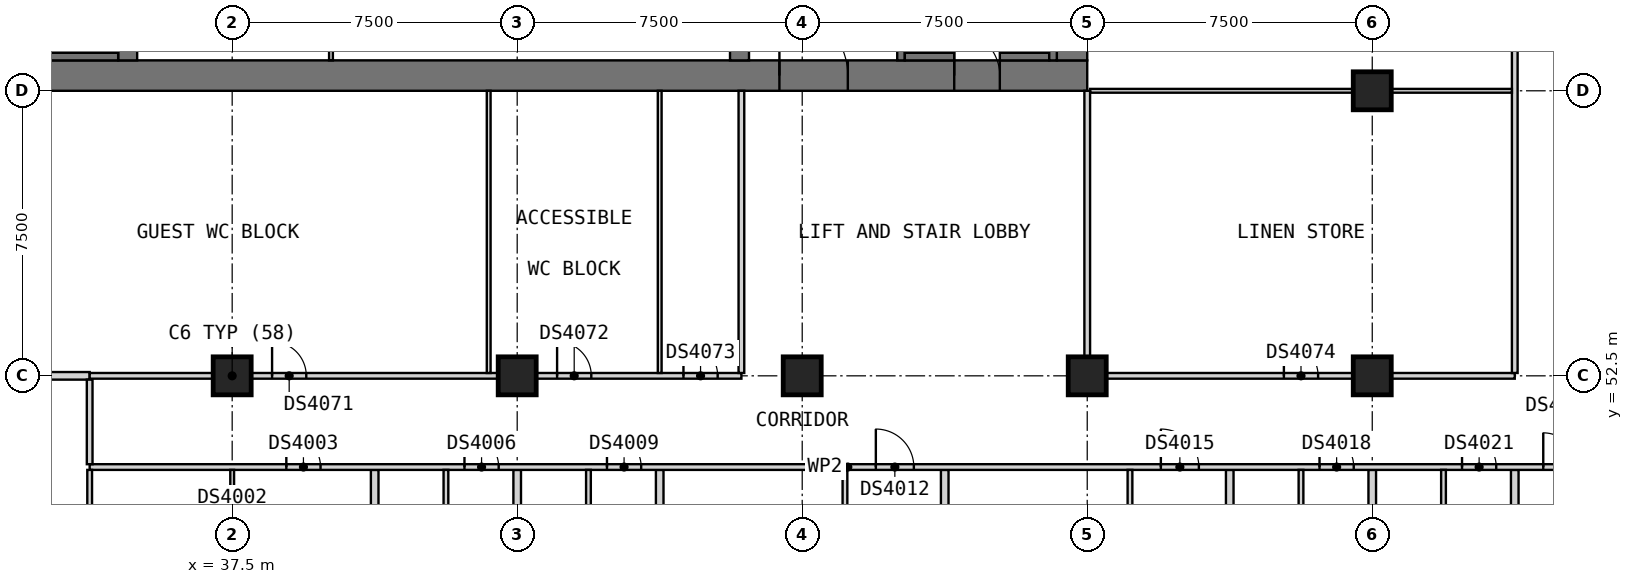
"""IFC4 building model, lengths in metres.
Left out: names, types, materials, properties, quantities, classifications, styles, units other than length and angle.
Written with IfcOpenShell. Run it as: python <this file> out.ifc"""

import sys

from ifc_helpers import new_model, si_unit, direction, frame, frame_2d, origin, origin_2d, place, context, subcontext, project, spatial, rectangle, extrude, element, fill, save


model = new_model("IFC4")
c1 = context("Model", 3, precision=1e-05, world=origin(), true_north=direction((0.0, 1.0)))
c2 = subcontext(c1, "Body", "Model", "MODEL_VIEW")
j1 = project(units=[si_unit("LENGTHUNIT", "METRE"), si_unit("PLANEANGLEUNIT", "RADIAN")], contexts=[c1])
p1 = place(None, origin())
s1 = spatial("IfcSite", under=j1, at=p1, CompositionType="ELEMENT")
p2 = place(p1, origin())
s2 = spatial("IfcBuilding", under=s1, at=p2, CompositionType="ELEMENT")
p3 = place(p2, frame((0.0, 0.0, 141.0)))
s3 = spatial("IfcBuildingStorey", under=s2, at=p3, CompositionType="ELEMENT", Elevation=141.0)
for number, where, z_axis, x_axis in (
    (1, (37.5, 52.5, 0.0), (0.0, 0.0, 1.0), (1.0, 0.0, 0.0)),
    (2, (45.0, 52.5, 0.0), (0.0, 0.0, 1.0), (1.0, 0.0, 0.0)),
    (3, (52.5, 52.5, 0.0), (0.0, 0.0, 1.0), (1.0, 0.0, 0.0)),
    (4, (60.0, 52.5, 0.0), (0.0, 0.0, 1.0), (1.0, 0.0, 0.0)),
    (5, (67.5, 52.5, 0.0), (0.0, 0.0, 1.0), (1.0, 0.0, 0.0)),
    (6, (67.5, 60.0, 0.0), (0.0, 0.0, 1.0), (1.0, 0.0, 0.0)),
):
    element("IfcColumn", number, at=place(p3, frame(where, z_axis=z_axis, x_axis=x_axis)), inside=s3, PredefinedType="COLUMN", context=c2, shape_type="SweptSolid", body=[
        extrude(rectangle(XDim=1.0, YDim=1.0, at=origin_2d()), origin(), (0.0, 0.0, 1.0), 3.6),
    ])
p4 = place(p3, frame((30.0, 60.4, 0.0), z_axis=(0.0, 0.0, 1.0), x_axis=(1.0, 0.0, 0.0)))
e7 = element("IfcWall", 7, at=p4, inside=s3, PredefinedType="SHEAR", context=c2, shape_type="SweptSolid", body=[
    extrude(rectangle(XDim=30.0, YDim=0.8, at=frame_2d((15.0, 0.0))), origin(), (0.0, 0.0, 1.0), 3.6),
])
p5 = place(p4, frame((21.9, 0.0, 0.0)))
e8 = element("IfcOpeningElement", 8, at=p5, cuts=e7, PredefinedType="OPENING", context=c2, shape_type="SweptSolid", body=[
    extrude(rectangle(XDim=1.8, YDim=2.1, at=frame_2d((0.9, 1.05))), frame((0.0, 0.41, 0.0), z_axis=(0.0, -1.0, 0.0), x_axis=(1.0, 0.0, 0.0)), (0.0, 0.0, 1.0), 0.82),
])
p6 = place(p4, frame((26.5, 0.0, 0.0)))
e9 = element("IfcOpeningElement", 9, at=p6, cuts=e7, PredefinedType="OPENING", context=c2, shape_type="SweptSolid", body=[
    extrude(rectangle(XDim=1.2, YDim=2.1, at=frame_2d((0.6, 1.05))), frame((0.0, 0.41, 0.0), z_axis=(0.0, -1.0, 0.0), x_axis=(1.0, 0.0, 0.0)), (0.0, 0.0, 1.0), 0.82),
])
p7 = place(p3, frame((59.6, 60.8, 0.0), z_axis=(0.0, 0.0, 1.0), x_axis=(0.0, 1.0, 0.0)))
e10 = element("IfcWall", 10, at=p7, inside=s3, PredefinedType="SHEAR", context=c2, shape_type="SweptSolid", body=[
    extrude(rectangle(XDim=20.9, YDim=0.8, at=frame_2d((10.45, 0.0))), origin(), (0.0, 0.0, 1.0), 3.6),
])
p8 = place(p7, frame((14.7, 0.0, 0.0)))
e11 = element("IfcOpeningElement", 11, at=p8, cuts=e10, PredefinedType="OPENING", context=c2, shape_type="SweptSolid", body=[
    extrude(rectangle(XDim=1.8, YDim=2.1, at=frame_2d((0.9, 1.05))), frame((0.0, 0.41, 0.0), z_axis=(0.0, -1.0, 0.0), x_axis=(1.0, 0.0, 0.0)), (0.0, 0.0, 1.0), 0.82),
])
for number, where, z_axis, x_axis in (
    (12, (34.75, 60.8, 0.0), (0.0, 0.0, 1.0), (0.0, 1.0, 0.0)),
    (13, (50.85, 60.8, 0.0), (0.0, 0.0, 1.0), (0.0, 1.0, 0.0)),
):
    element("IfcWall", number, at=place(p3, frame(where, z_axis=z_axis, x_axis=x_axis)), inside=s3, PredefinedType="SHEAR", context=c2, shape_type="SweptSolid", body=[
        extrude(rectangle(XDim=3.4, YDim=0.5, at=frame_2d((1.7, 0.0))), origin(), (0.0, 0.0, 1.0), 3.6),
    ])
p9 = place(p3, frame((40.1, 60.8, 0.0), z_axis=(0.0, 0.0, 1.0), x_axis=(0.0, 1.0, 0.0)))
e14 = element("IfcWall", 14, at=p9, inside=s3, PredefinedType="PARTITIONING", context=c2, shape_type="SweptSolid", body=[
    extrude(rectangle(XDim=3.2, YDim=0.1, at=frame_2d((1.6, 0.0))), origin(), (0.0, 0.0, 1.0), 3.35),
])
p10 = place(p3, frame((55.1, 60.8, 0.0), z_axis=(0.0, 0.0, 1.0), x_axis=(0.0, 1.0, 0.0)))
e15 = element("IfcWall", 15, at=p10, inside=s3, PredefinedType="SOLIDWALL", context=c2, shape_type="SweptSolid", body=[
    extrude(rectangle(XDim=7.8, YDim=0.2, at=frame_2d((3.9, 0.0))), origin(), (0.0, 0.0, 1.0), 3.35),
])
p11 = place(p3, frame((31.0, 60.9, 0.0), z_axis=(0.0, 0.0, 1.0), x_axis=(1.0, 0.0, 0.0)))
e16 = element("IfcWall", 16, at=p11, inside=s3, PredefinedType="SOLIDWALL", context=c2, shape_type="SweptSolid", body=[
    extrude(rectangle(XDim=3.5, YDim=0.2, at=frame_2d((1.75, 0.0))), origin(), (0.0, 0.0, 1.0), 3.35),
])
for number, where, z_axis, x_axis in (
    (17, (55.2, 60.9, 0.0), (0.0, 0.0, 1.0), (1.0, 0.0, 0.0)),
    (18, (57.7, 60.9, 0.0), (0.0, 0.0, 1.0), (1.0, 0.0, 0.0)),
):
    element("IfcWall", number, at=place(p3, frame(where, z_axis=z_axis, x_axis=x_axis)), inside=s3, PredefinedType="SOLIDWALL", context=c2, shape_type="SweptSolid", body=[
        extrude(rectangle(XDim=1.3, YDim=0.2, at=frame_2d((0.65, 0.0))), origin(), (0.0, 0.0, 1.0), 3.35),
    ])
p12 = place(p3, frame((59.1, 60.8, 0.0), z_axis=(0.0, 0.0, 1.0), x_axis=(0.0, 1.0, 0.0)))
e19 = element("IfcWall", 19, at=p12, inside=s3, PredefinedType="SOLIDWALL", context=c2, shape_type="SweptSolid", body=[
    extrude(rectangle(XDim=7.7, YDim=0.2, at=frame_2d((3.85, 0.0))), origin(), (0.0, 0.0, 1.0), 3.35),
])
p13 = place(p3, frame((30.0, 52.5, 0.0), z_axis=(0.0, 0.0, 1.0), x_axis=(1.0, 0.0, 0.0)))
e20 = element("IfcWall", 20, at=p13, inside=s3, PredefinedType="PARTITIONING", context=c2, shape_type="SweptSolid", body=[
    extrude(rectangle(XDim=3.75, YDim=0.2, at=frame_2d((1.875, 0.0))), origin(), (0.0, 0.0, 1.0), 3.35),
])
p14 = place(p3, frame((41.25, 38.31, 0.0), z_axis=(0.0, 0.0, 1.0), x_axis=(0.0, 1.0, 0.0)))
e21 = element("IfcWall", 21, at=p14, inside=s3, PredefinedType="PARTITIONING", context=c2, shape_type="SweptSolid", body=[
    extrude(rectangle(XDim=11.715, YDim=0.2, at=frame_2d((5.857, 0.0))), origin(), (0.0, 0.0, 1.0), 3.35),
])
p15 = place(p3, frame((45.0, 37.5, 0.0), z_axis=(0.0, 0.0, 1.0), x_axis=(0.0, 1.0, 0.0)))
e22 = element("IfcWall", 22, at=p15, inside=s3, PredefinedType="PARTITIONING", context=c2, shape_type="SweptSolid", body=[
    extrude(rectangle(XDim=12.525, YDim=0.2, at=frame_2d((6.262, 0.0))), origin(), (0.0, 0.0, 1.0), 3.35),
])
for number, where, z_axis, x_axis in (
    (23, (48.75, 38.31, 0.0), (0.0, 0.0, 1.0), (0.0, 1.0, 0.0)),
    (24, (56.25, 38.31, 0.0), (0.0, 0.0, 1.0), (0.0, 1.0, 0.0)),
    (25, (63.75, 38.31, 0.0), (0.0, 0.0, 1.0), (0.0, 1.0, 0.0)),
):
    element("IfcWall", number, at=place(p3, frame(where, z_axis=z_axis, x_axis=x_axis)), inside=s3, PredefinedType="PARTITIONING", context=c2, shape_type="SweptSolid", body=[
        extrude(rectangle(XDim=11.715, YDim=0.2, at=frame_2d((5.857, 0.0))), origin(), (0.0, 0.0, 1.0), 3.35),
    ])
p16 = place(p3, frame((67.5, 37.5, 0.0), z_axis=(0.0, 0.0, 1.0), x_axis=(0.0, 1.0, 0.0)))
e26 = element("IfcWall", 26, at=p16, inside=s3, PredefinedType="PARTITIONING", context=c2, shape_type="SweptSolid", body=[
    extrude(rectangle(XDim=12.525, YDim=0.2, at=frame_2d((6.262, 0.0))), origin(), (0.0, 0.0, 1.0), 3.35),
])
p17 = place(p3, frame((71.25, 38.31, 0.0), z_axis=(0.0, 0.0, 1.0), x_axis=(0.0, 1.0, 0.0)))
e27 = element("IfcWall", 27, at=p17, inside=s3, PredefinedType="PARTITIONING", context=c2, shape_type="SweptSolid", body=[
    extrude(rectangle(XDim=11.715, YDim=0.2, at=frame_2d((5.857, 0.0))), origin(), (0.0, 0.0, 1.0), 3.35),
])
p18 = place(p3, frame((33.75, 50.1, 0.0), z_axis=(0.0, 0.0, 1.0), x_axis=(1.0, 0.0, 0.0)))
e28 = element("IfcWall", 28, at=p18, inside=s3, PredefinedType="PARTITIONING", context=c2, shape_type="SweptSolid", body=[
    extrude(rectangle(XDim=39.9, YDim=0.15, at=frame_2d((19.95, 0.0))), origin(), (0.0, 0.0, 1.0), 3.35),
])
p19 = place(p18, frame((5.175, 0.0, 0.0)))
e29 = element("IfcOpeningElement", 29, at=p19, cuts=e28, PredefinedType="OPENING", context=c2, shape_type="SweptSolid", body=[
    extrude(rectangle(XDim=0.9, YDim=2.1, at=frame_2d((0.45, 1.05))), frame((0.0, 0.085, 0.0), z_axis=(0.0, -1.0, 0.0), x_axis=(1.0, 0.0, 0.0)), (0.0, 0.0, 1.0), 0.17),
])
p20 = place(p18, frame((9.863, 0.0, 0.0)))
e30 = element("IfcOpeningElement", 30, at=p20, cuts=e28, PredefinedType="OPENING", context=c2, shape_type="SweptSolid", body=[
    extrude(rectangle(XDim=0.9, YDim=2.1, at=frame_2d((0.45, 1.05))), frame((0.0, 0.085, 0.0), z_axis=(0.0, -1.0, 0.0), x_axis=(1.0, 0.0, 0.0)), (0.0, 0.0, 1.0), 0.17),
])
p21 = place(p18, frame((13.613, 0.0, 0.0)))
e31 = element("IfcOpeningElement", 31, at=p21, cuts=e28, PredefinedType="OPENING", context=c2, shape_type="SweptSolid", body=[
    extrude(rectangle(XDim=0.9, YDim=2.1, at=frame_2d((0.45, 1.05))), frame((0.0, 0.085, 0.0), z_axis=(0.0, -1.0, 0.0), x_axis=(1.0, 0.0, 0.0)), (0.0, 0.0, 1.0), 0.17),
])
p22 = place(p18, frame((20.688, 0.0, 0.0)))
e32 = element("IfcOpeningElement", 32, at=p22, cuts=e28, PredefinedType="OPENING", context=c2, shape_type="SweptSolid", body=[
    extrude(rectangle(XDim=1.0, YDim=2.1, at=frame_2d((0.5, 1.05))), frame((0.0, 0.085, 0.0), z_axis=(0.0, -1.0, 0.0), x_axis=(1.0, 0.0, 0.0)), (0.0, 0.0, 1.0), 0.17),
])
p23 = place(p18, frame((28.188, 0.0, 0.0)))
e33 = element("IfcOpeningElement", 33, at=p23, cuts=e28, PredefinedType="OPENING", context=c2, shape_type="SweptSolid", body=[
    extrude(rectangle(XDim=1.0, YDim=2.1, at=frame_2d((0.5, 1.05))), frame((0.0, 0.085, 0.0), z_axis=(0.0, -1.0, 0.0), x_axis=(1.0, 0.0, 0.0)), (0.0, 0.0, 1.0), 0.17),
])
p24 = place(p18, frame((32.363, 0.0, 0.0)))
e34 = element("IfcOpeningElement", 34, at=p24, cuts=e28, PredefinedType="OPENING", context=c2, shape_type="SweptSolid", body=[
    extrude(rectangle(XDim=0.9, YDim=2.1, at=frame_2d((0.45, 1.05))), frame((0.0, 0.085, 0.0), z_axis=(0.0, -1.0, 0.0), x_axis=(1.0, 0.0, 0.0)), (0.0, 0.0, 1.0), 0.17),
])
p25 = place(p18, frame((36.113, 0.0, 0.0)))
e35 = element("IfcOpeningElement", 35, at=p25, cuts=e28, PredefinedType="OPENING", context=c2, shape_type="SweptSolid", body=[
    extrude(rectangle(XDim=0.9, YDim=2.1, at=frame_2d((0.45, 1.05))), frame((0.0, 0.085, 0.0), z_axis=(0.0, -1.0, 0.0), x_axis=(1.0, 0.0, 0.0)), (0.0, 0.0, 1.0), 0.17),
])
p26 = place(p18, frame((38.25, 0.0, 0.0)))
e36 = element("IfcOpeningElement", 36, at=p26, cuts=e28, PredefinedType="OPENING", context=c2, shape_type="SweptSolid", body=[
    extrude(rectangle(XDim=0.9, YDim=2.1, at=frame_2d((0.45, 1.05))), frame((0.0, 0.085, 0.0), z_axis=(0.0, -1.0, 0.0), x_axis=(1.0, 0.0, 0.0)), (0.0, 0.0, 1.0), 0.17),
])
p27 = place(p3, frame((33.75, 52.5, 0.0), z_axis=(0.0, 0.0, 1.0), x_axis=(1.0, 0.0, 0.0)))
e37 = element("IfcWall", 37, at=p27, inside=s3, PredefinedType="PARTITIONING", context=c2, shape_type="SweptSolid", body=[
    extrude(rectangle(XDim=17.15, YDim=0.15, at=frame_2d((8.575, 0.0))), origin(), (0.0, 0.0, 1.0), 3.35),
])
p28 = place(p27, frame((4.8, 0.0, 0.0)))
e38 = element("IfcOpeningElement", 38, at=p28, cuts=e37, PredefinedType="OPENING", context=c2, shape_type="SweptSolid", body=[
    extrude(rectangle(XDim=0.9, YDim=2.1, at=frame_2d((0.45, 1.05))), frame((0.0, 0.085, 0.0), z_axis=(0.0, -1.0, 0.0), x_axis=(1.0, 0.0, 0.0)), (0.0, 0.0, 1.0), 0.17),
])
p29 = place(p27, frame((12.3, 0.0, 0.0)))
e39 = element("IfcOpeningElement", 39, at=p29, cuts=e37, PredefinedType="OPENING", context=c2, shape_type="SweptSolid", body=[
    extrude(rectangle(XDim=0.9, YDim=2.1, at=frame_2d((0.45, 1.05))), frame((0.0, 0.085, 0.0), z_axis=(0.0, -1.0, 0.0), x_axis=(1.0, 0.0, 0.0)), (0.0, 0.0, 1.0), 0.17),
])
p30 = place(p27, frame((15.625, 0.0, 0.0)))
e40 = element("IfcOpeningElement", 40, at=p30, cuts=e37, PredefinedType="OPENING", context=c2, shape_type="SweptSolid", body=[
    extrude(rectangle(XDim=0.9, YDim=2.1, at=frame_2d((0.45, 1.05))), frame((0.0, 0.085, 0.0), z_axis=(0.0, -1.0, 0.0), x_axis=(1.0, 0.0, 0.0)), (0.0, 0.0, 1.0), 0.17),
])
p31 = place(p3, frame((60.0, 52.5, 0.0), z_axis=(0.0, 0.0, 1.0), x_axis=(1.0, 0.0, 0.0)))
e41 = element("IfcWall", 41, at=p31, inside=s3, PredefinedType="PARTITIONING", context=c2, shape_type="SweptSolid", body=[
    extrude(rectangle(XDim=11.25, YDim=0.15, at=frame_2d((5.625, 0.0))), origin(), (0.0, 0.0, 1.0), 3.35),
])
p32 = place(p31, frame((5.175, 0.0, 0.0)))
e42 = element("IfcOpeningElement", 42, at=p32, cuts=e41, PredefinedType="OPENING", context=c2, shape_type="SweptSolid", body=[
    extrude(rectangle(XDim=0.9, YDim=2.1, at=frame_2d((0.45, 1.05))), frame((0.0, 0.085, 0.0), z_axis=(0.0, -1.0, 0.0), x_axis=(1.0, 0.0, 0.0)), (0.0, 0.0, 1.0), 0.17),
])
p33 = place(p3, frame((33.75, 50.175, 0.0), z_axis=(0.0, 0.0, 1.0), x_axis=(0.0, 1.0, 0.0)))
e43 = element("IfcWall", 43, at=p33, inside=s3, PredefinedType="PARTITIONING", context=c2, shape_type="SweptSolid", body=[
    extrude(rectangle(XDim=2.225, YDim=0.15, at=frame_2d((1.112, 0.0))), origin(), (0.0, 0.0, 1.0), 3.35),
])
p34 = place(p3, frame((71.25, 52.575, 0.0), z_axis=(0.0, 0.0, 1.0), x_axis=(0.0, 1.0, 0.0)))
e44 = element("IfcWall", 44, at=p34, inside=s3, PredefinedType="PARTITIONING", context=c2, shape_type="SweptSolid", body=[
    extrude(rectangle(XDim=11.85, YDim=0.15, at=frame_2d((5.925, 0.0))), origin(), (0.0, 0.0, 1.0), 3.35),
])
p35 = place(p34, frame((9.225, 0.0, 0.0)))
e45 = element("IfcOpeningElement", 45, at=p35, cuts=e44, PredefinedType="OPENING", context=c2, shape_type="SweptSolid", body=[
    extrude(rectangle(XDim=0.9, YDim=2.1, at=frame_2d((0.45, 1.05))), frame((0.0, 0.085, 0.0), z_axis=(0.0, -1.0, 0.0), x_axis=(1.0, 0.0, 0.0)), (0.0, 0.0, 1.0), 0.17),
])
p36 = place(p3, frame((60.075, 60.0, 0.0), z_axis=(0.0, 0.0, 1.0), x_axis=(1.0, 0.0, 0.0)))
e46 = element("IfcWall", 46, at=p36, inside=s3, PredefinedType="PARTITIONING", context=c2, shape_type="SweptSolid", body=[
    extrude(rectangle(XDim=11.1, YDim=0.1, at=frame_2d((5.55, 0.0))), origin(), (0.0, 0.0, 1.0), 3.35),
])
p37 = place(p3, frame((37.5, 45.3, 0.0), z_axis=(0.0, 0.0, 1.0), x_axis=(0.0, 1.0, 0.0)))
e47 = element("IfcWall", 47, at=p37, inside=s3, PredefinedType="PARTITIONING", context=c2, shape_type="SweptSolid", body=[
    extrude(rectangle(XDim=4.725, YDim=0.1, at=frame_2d((2.362, 0.0))), origin(), (0.0, 0.0, 1.0), 3.35),
])
p38 = place(p37, frame((1.925, 0.0, 0.0)))
e48 = element("IfcOpeningElement", 48, at=p38, cuts=e47, PredefinedType="OPENING", context=c2, shape_type="SweptSolid", body=[
    extrude(rectangle(XDim=0.9, YDim=2.1, at=frame_2d((0.45, 1.05))), frame((0.0, 0.06, 0.0), z_axis=(0.0, -1.0, 0.0), x_axis=(1.0, 0.0, 0.0)), (0.0, 0.0, 1.0), 0.12),
])
for number, where, z_axis, x_axis in (
    (49, (44.25, 52.575, 0.0), (0.0, 0.0, 1.0), (0.0, 1.0, 0.0)),
    (50, (48.75, 52.575, 0.0), (0.0, 0.0, 1.0), (0.0, 1.0, 0.0)),
):
    element("IfcWall", number, at=place(p3, frame(where, z_axis=z_axis, x_axis=x_axis)), inside=s3, PredefinedType="PARTITIONING", context=c2, shape_type="SweptSolid", body=[
        extrude(rectangle(XDim=7.425, YDim=0.1, at=frame_2d((3.712, 0.0))), origin(), (0.0, 0.0, 1.0), 3.35),
    ])
for number, where, z_axis, x_axis in (
    (51, (33.75, 45.312, 0.0), (0.0, 0.0, 1.0), (0.0, 1.0, 0.0)),
    (52, (43.125, 45.312, 0.0), (0.0, 0.0, 1.0), (0.0, 1.0, 0.0)),
    (53, (46.875, 45.312, 0.0), (0.0, 0.0, 1.0), (0.0, 1.0, 0.0)),
    (54, (53.625, 45.312, 0.0), (0.0, 0.0, 1.0), (0.0, 1.0, 0.0)),
    (55, (61.125, 45.312, 0.0), (0.0, 0.0, 1.0), (0.0, 1.0, 0.0)),
    (56, (65.625, 45.312, 0.0), (0.0, 0.0, 1.0), (0.0, 1.0, 0.0)),
    (57, (69.375, 45.312, 0.0), (0.0, 0.0, 1.0), (0.0, 1.0, 0.0)),
):
    element("IfcWall", number, at=place(p3, frame(where, z_axis=z_axis, x_axis=x_axis)), inside=s3, PredefinedType="PARTITIONING", context=c2, shape_type="SweptSolid", body=[
        extrude(rectangle(XDim=4.712, YDim=0.125, at=frame_2d((2.356, 0.0))), origin(), (0.0, 0.0, 1.0), 3.35),
    ])
for number, where, z_axis, x_axis in (
    (58, (50.9, 52.575, 0.0), (0.0, 0.0, 1.0), (0.0, 1.0, 0.0)),
    (59, (60.0, 52.575, 0.0), (0.0, 0.0, 1.0), (0.0, 1.0, 0.0)),
):
    element("IfcWall", number, at=place(p3, frame(where, z_axis=z_axis, x_axis=x_axis)), inside=s3, PredefinedType="PARTITIONING", context=c2, shape_type="SweptSolid", body=[
        extrude(rectangle(XDim=7.425, YDim=0.15, at=frame_2d((3.712, 0.0))), origin(), (0.0, 0.0, 1.0), 3.35),
    ])
p39 = place(p5, origin())
e60 = element("IfcDoor", 60, at=p39, inside=s3, OperationType="DOUBLE_DOOR_SINGLE_SWING", PredefinedType="DOOR", context=c2, shape_type="SweptSolid", body=[
    extrude(rectangle(XDim=1.8, YDim=2.1, at=frame_2d((0.9, 1.05))), frame((0.0, 0.025, 0.0), z_axis=(0.0, -1.0, 0.0), x_axis=(1.0, 0.0, 0.0)), (0.0, 0.0, 1.0), 0.05),
])
fill(e8, e60)
p40 = place(p6, origin())
e61 = element("IfcDoor", 61, at=p40, inside=s3, OperationType="SINGLE_SWING_LEFT", PredefinedType="DOOR", context=c2, shape_type="SweptSolid", body=[
    extrude(rectangle(XDim=1.2, YDim=2.1, at=frame_2d((0.6, 1.05))), frame((0.0, 0.025, 0.0), z_axis=(0.0, -1.0, 0.0), x_axis=(1.0, 0.0, 0.0)), (0.0, 0.0, 1.0), 0.05),
])
fill(e9, e61)
p41 = place(p19, origin())
e62 = element("IfcDoor", 62, at=p41, inside=s3, OperationType="SINGLE_SWING_RIGHT", PredefinedType="DOOR", context=c2, shape_type="SweptSolid", body=[
    extrude(rectangle(XDim=0.9, YDim=2.1, at=frame_2d((0.45, 1.05))), frame((0.0, 0.025, 0.0), z_axis=(0.0, -1.0, 0.0), x_axis=(1.0, 0.0, 0.0)), (0.0, 0.0, 1.0), 0.05),
])
fill(e29, e62)
p42 = place(p20, origin())
e63 = element("IfcDoor", 63, at=p42, inside=s3, OperationType="SINGLE_SWING_RIGHT", PredefinedType="DOOR", context=c2, shape_type="SweptSolid", body=[
    extrude(rectangle(XDim=0.9, YDim=2.1, at=frame_2d((0.45, 1.05))), frame((0.0, 0.025, 0.0), z_axis=(0.0, -1.0, 0.0), x_axis=(1.0, 0.0, 0.0)), (0.0, 0.0, 1.0), 0.05),
])
fill(e30, e63)
p43 = place(p21, origin())
e64 = element("IfcDoor", 64, at=p43, inside=s3, OperationType="SINGLE_SWING_RIGHT", PredefinedType="DOOR", context=c2, shape_type="SweptSolid", body=[
    extrude(rectangle(XDim=0.9, YDim=2.1, at=frame_2d((0.45, 1.05))), frame((0.0, 0.025, 0.0), z_axis=(0.0, -1.0, 0.0), x_axis=(1.0, 0.0, 0.0)), (0.0, 0.0, 1.0), 0.05),
])
fill(e31, e64)
p44 = place(p22, origin())
e65 = element("IfcDoor", 65, at=p44, inside=s3, OperationType="SINGLE_SWING_RIGHT", PredefinedType="DOOR", context=c2, shape_type="SweptSolid", body=[
    extrude(rectangle(XDim=1.0, YDim=2.1, at=frame_2d((0.5, 1.05))), frame((0.0, 0.025, 0.0), z_axis=(0.0, -1.0, 0.0), x_axis=(1.0, 0.0, 0.0)), (0.0, 0.0, 1.0), 0.05),
])
fill(e32, e65)
p45 = place(p23, origin())
e66 = element("IfcDoor", 66, at=p45, inside=s3, OperationType="SINGLE_SWING_RIGHT", PredefinedType="DOOR", context=c2, shape_type="SweptSolid", body=[
    extrude(rectangle(XDim=1.0, YDim=2.1, at=frame_2d((0.5, 1.05))), frame((0.0, 0.025, 0.0), z_axis=(0.0, -1.0, 0.0), x_axis=(1.0, 0.0, 0.0)), (0.0, 0.0, 1.0), 0.05),
])
fill(e33, e66)
p46 = place(p24, origin())
e67 = element("IfcDoor", 67, at=p46, inside=s3, OperationType="SINGLE_SWING_RIGHT", PredefinedType="DOOR", context=c2, shape_type="SweptSolid", body=[
    extrude(rectangle(XDim=0.9, YDim=2.1, at=frame_2d((0.45, 1.05))), frame((0.0, 0.025, 0.0), z_axis=(0.0, -1.0, 0.0), x_axis=(1.0, 0.0, 0.0)), (0.0, 0.0, 1.0), 0.05),
])
fill(e34, e67)
p47 = place(p25, origin())
e68 = element("IfcDoor", 68, at=p47, inside=s3, OperationType="SINGLE_SWING_RIGHT", PredefinedType="DOOR", context=c2, shape_type="SweptSolid", body=[
    extrude(rectangle(XDim=0.9, YDim=2.1, at=frame_2d((0.45, 1.05))), frame((0.0, 0.025, 0.0), z_axis=(0.0, -1.0, 0.0), x_axis=(1.0, 0.0, 0.0)), (0.0, 0.0, 1.0), 0.05),
])
fill(e35, e68)
p48 = place(p26, origin())
e69 = element("IfcDoor", 69, at=p48, inside=s3, OperationType="SINGLE_SWING_LEFT", PredefinedType="DOOR", context=c2, shape_type="SweptSolid", body=[
    extrude(rectangle(XDim=0.9, YDim=2.1, at=frame_2d((0.45, 1.05))), frame((0.0, 0.025, 0.0), z_axis=(0.0, -1.0, 0.0), x_axis=(1.0, 0.0, 0.0)), (0.0, 0.0, 1.0), 0.05),
])
fill(e36, e69)
p49 = place(p28, origin())
e70 = element("IfcDoor", 70, at=p49, inside=s3, OperationType="SINGLE_SWING_LEFT", PredefinedType="DOOR", context=c2, shape_type="SweptSolid", body=[
    extrude(rectangle(XDim=0.9, YDim=2.1, at=frame_2d((0.45, 1.05))), frame((0.0, 0.025, 0.0), z_axis=(0.0, -1.0, 0.0), x_axis=(1.0, 0.0, 0.0)), (0.0, 0.0, 1.0), 0.05),
])
fill(e38, e70)
p50 = place(p29, origin())
e71 = element("IfcDoor", 71, at=p50, inside=s3, OperationType="SINGLE_SWING_LEFT", PredefinedType="DOOR", context=c2, shape_type="SweptSolid", body=[
    extrude(rectangle(XDim=0.9, YDim=2.1, at=frame_2d((0.45, 1.05))), frame((0.0, 0.025, 0.0), z_axis=(0.0, -1.0, 0.0), x_axis=(1.0, 0.0, 0.0)), (0.0, 0.0, 1.0), 0.05),
])
fill(e39, e71)
p51 = place(p30, origin())
e72 = element("IfcDoor", 72, at=p51, inside=s3, OperationType="SINGLE_SWING_LEFT", PredefinedType="DOOR", context=c2, shape_type="SweptSolid", body=[
    extrude(rectangle(XDim=0.9, YDim=2.1, at=frame_2d((0.45, 1.05))), frame((0.0, 0.025, 0.0), z_axis=(0.0, -1.0, 0.0), x_axis=(1.0, 0.0, 0.0)), (0.0, 0.0, 1.0), 0.05),
])
fill(e40, e72)
p52 = place(p32, origin())
e73 = element("IfcDoor", 73, at=p52, inside=s3, OperationType="SINGLE_SWING_LEFT", PredefinedType="DOOR", context=c2, shape_type="SweptSolid", body=[
    extrude(rectangle(XDim=0.9, YDim=2.1, at=frame_2d((0.45, 1.05))), frame((0.0, 0.025, 0.0), z_axis=(0.0, -1.0, 0.0), x_axis=(1.0, 0.0, 0.0)), (0.0, 0.0, 1.0), 0.05),
])
fill(e42, e73)
save(model, sys.argv[1])
